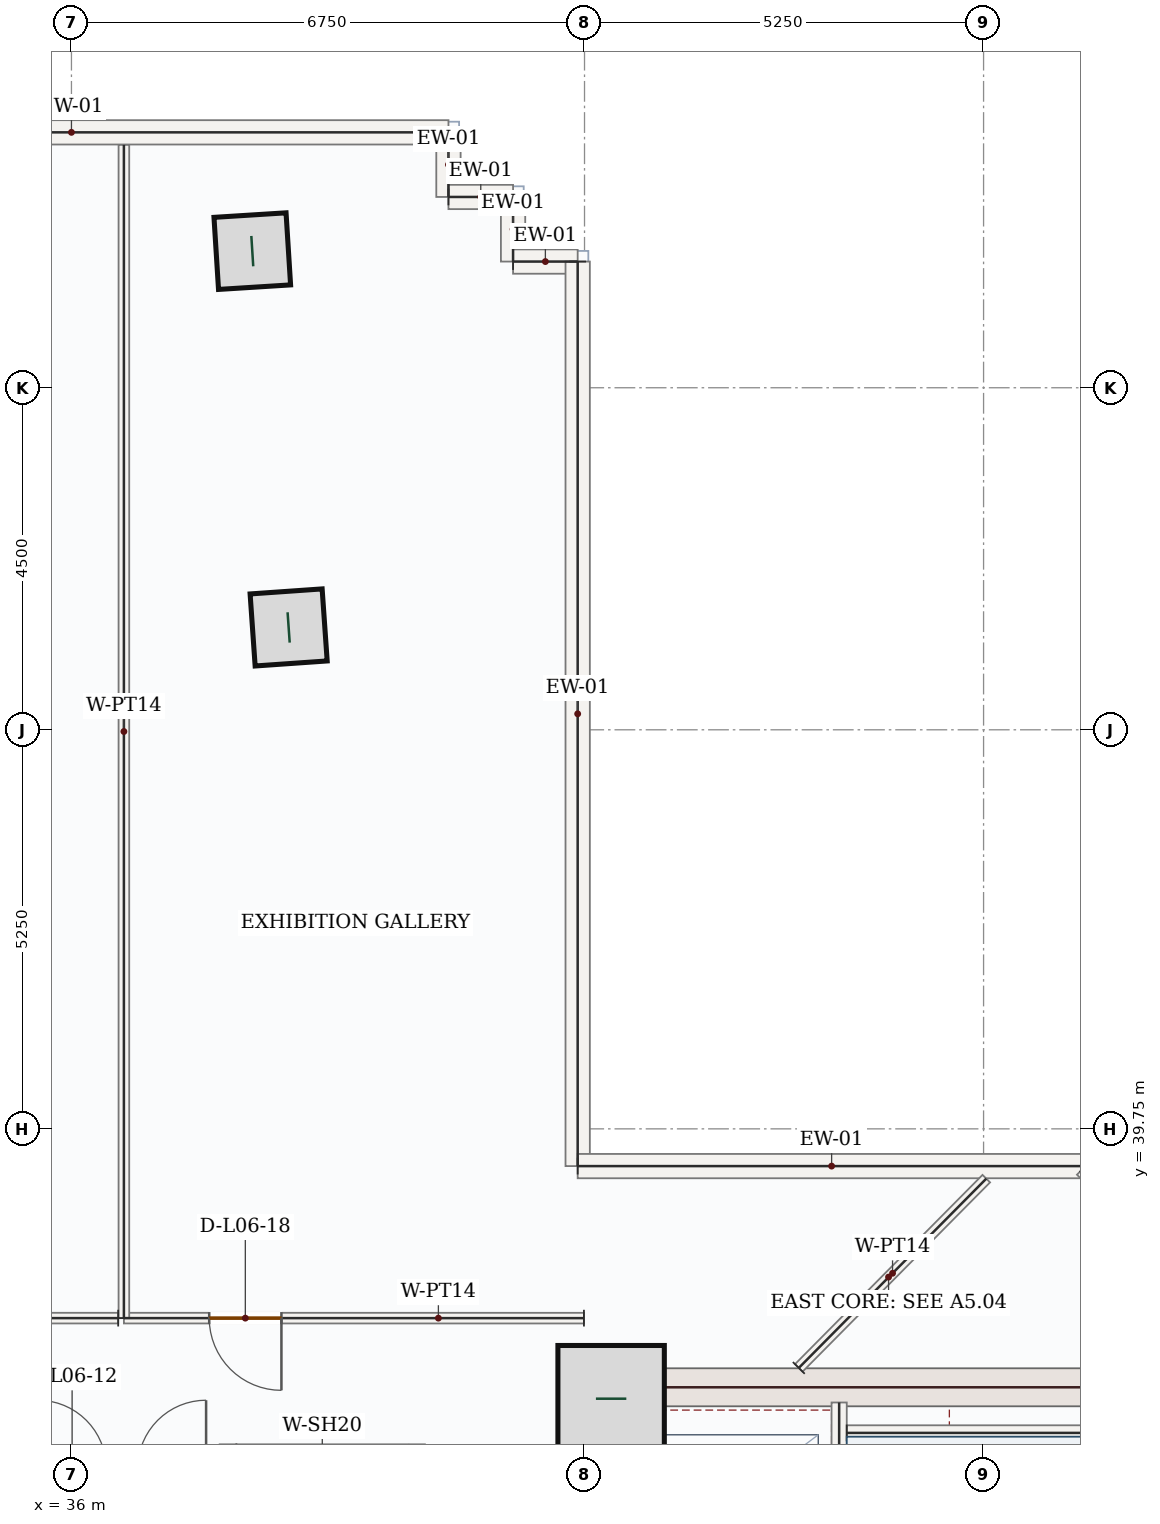
"""IFC4 building model, lengths in metres.
Left out: names, types, materials, properties, quantities, classifications, styles, units other than length and angle.
Written with IfcOpenShell. Run it as: python <this file> out.ifc"""

import sys

from ifc_helpers import new_model, si_unit, direction, frame, frame_2d, origin, origin_2d, place, context, subcontext, project, spatial, rectangle, hollow_rectangle, extrude, source, transform, mapped, element, fill, save


model = new_model("IFC4")
c1 = context("Model", 3, precision=1e-05, world=origin(), true_north=direction((0.0, 1.0)))
c2 = subcontext(c1, "Body", "Model", "MODEL_VIEW")
j1 = project(units=[si_unit("LENGTHUNIT", "METRE"), si_unit("PLANEANGLEUNIT", "RADIAN")], contexts=[c1])
p1 = place(None, origin())
s1 = spatial("IfcSite", under=j1, at=p1, CompositionType="ELEMENT")
p2 = place(p1, origin())
s2 = spatial("IfcBuilding", under=s1, at=p2, CompositionType="ELEMENT")
p3 = place(p2, frame((0.0, 0.0, 33.3)))
s3 = spatial("IfcBuildingStorey", under=s2, at=p3, CompositionType="ELEMENT", Elevation=33.3)
p4 = place(p3, frame((43.0, 28.05, 0.0), z_axis=(0.0, 0.0, 1.0), x_axis=(0.0, 1.0, 0.0)))
e1 = element("IfcWall", 1, at=p4, inside=s3, PredefinedType="SHEAR", context=c2, shape_type="SweptSolid", body=[
    extrude(rectangle(XDim=8.55, YDim=0.5, at=frame_2d((4.275, 0.0))), origin(), (0.0, 0.0, 1.0), 3.95),
])
p5 = place(p4, frame((1.5, 0.0, 0.0)))
e2 = element("IfcOpeningElement", 2, at=p5, cuts=e1, PredefinedType="OPENING", context=c2, shape_type="SweptSolid", body=[
    extrude(rectangle(XDim=1.1, YDim=2.2, at=frame_2d((0.55, 1.1))), frame((0.0, 0.26, 0.0), z_axis=(0.0, -1.0, 0.0), x_axis=(1.0, 0.0, 0.0)), (0.0, 0.0, 1.0), 0.52),
])
m1 = source(origin(), c2, "Body", "SweptSolid", [
    extrude(rectangle(XDim=7.0, YDim=0.5, at=frame_2d((3.5, 0.0))), origin(), (0.0, 0.0, 1.0), 3.95),
])
p6 = place(p3, frame((43.25, 36.35, 0.0), z_axis=(0.0, 0.0, 1.0), x_axis=(1.0, 0.0, 0.0)))
e3 = element("IfcWall", 3, at=p6, inside=s3, PredefinedType="SHEAR", context=c2, shape_type="MappedRepresentation", body=[
    mapped(m1, transform((0.0, 0.0, 0.0), x_axis=(1.0, 0.0, 0.0), y_axis=(0.0, 1.0, 0.0), z_axis=(0.0, 0.0, 1.0), scale=1.0)),
])
m2 = source(origin(), c2, "Body", "SweptSolid", [
    extrude(rectangle(XDim=1.4, YDim=1.4, at=origin_2d()), origin(), (0.0, 0.0, 1.0), 4.2),
])
p7 = place(p3, frame((43.1, 36.2, 0.0), z_axis=(0.0, 0.0, 1.0), x_axis=(1.0, 0.0, 0.0)))
e4 = element("IfcColumn", 4, at=p7, inside=s3, PredefinedType="COLUMN", context=c2, shape_type="MappedRepresentation", body=[
    mapped(m2, transform((0.0, 0.0, 0.0), x_axis=(1.0, 0.0, 0.0), y_axis=(0.0, 1.0, 0.0), z_axis=(0.0, 0.0, 1.0), scale=1.0)),
])
m3 = source(origin(), c2, "Body", "SweptSolid", [
    extrude(hollow_rectangle(XDim=0.95, YDim=0.95, WallThickness=0.05, at=origin_2d()), origin(), (0.0, 0.0, 1.0), 4.2),
])
for number, where, z_axis, x_axis in (
    (5, (38.857, 46.346, 0.0), (0.0, 0.0, 1.0), (-0.07, 0.998, 0.0)),
    (6, (38.379, 51.297, 0.0), (0.0, 0.0, 1.0), (-0.063, 0.998, 0.0)),
):
    element("IfcColumn", number, at=place(p3, frame(where, z_axis=z_axis, x_axis=x_axis)), inside=s3, PredefinedType="COLUMN", context=c2, shape_type="MappedRepresentation", body=[
        mapped(m3, transform((0.0, 0.0, 0.0), x_axis=(1.0, 0.0, 0.0), y_axis=(0.0, 1.0, 0.0), z_axis=(0.0, 0.0, 1.0), scale=1.0)),
    ])
m4 = source(origin(), c2, "Body", "SweptSolid", [
    extrude(rectangle(XDim=9.92, YDim=0.32, at=frame_2d((4.96, 0.0))), origin(), (0.0, 0.0, 1.0), 3.95),
])
p8 = place(p3, frame((31.04, 52.86, 0.0), z_axis=(0.0, 0.0, 1.0), x_axis=(1.0, 0.0, 0.0)))
e7 = element("IfcWall", 7, at=p8, inside=s3, PredefinedType="SOLIDWALL", context=c2, shape_type="MappedRepresentation", body=[
    mapped(m4, transform((0.0, 0.0, 0.0), x_axis=(1.0, 0.0, 0.0), y_axis=(0.0, 1.0, 0.0), z_axis=(0.0, 0.0, 1.0), scale=1.0)),
])
m5 = source(origin(), c2, "Body", "SweptSolid", [
    extrude(rectangle(XDim=0.85, YDim=0.32, at=frame_2d((0.425, 0.0))), origin(), (0.0, 0.0, 1.0), 3.95),
])
for number, where, z_axis, x_axis in (
    (8, (40.96, 52.86, 0.0), (0.0, 0.0, 1.0), (0.0, -1.0, 0.0)),
    (9, (40.96, 52.01, 0.0), (0.0, 0.0, 1.0), (1.0, 0.0, 0.0)),
    (10, (41.81, 52.01, 0.0), (0.0, 0.0, 1.0), (0.0, -1.0, 0.0)),
):
    element("IfcWall", number, at=place(p3, frame(where, z_axis=z_axis, x_axis=x_axis)), inside=s3, PredefinedType="SOLIDWALL", context=c2, shape_type="MappedRepresentation", body=[
        mapped(m5, transform((0.0, 0.0, 0.0), x_axis=(1.0, 0.0, 0.0), y_axis=(0.0, 1.0, 0.0), z_axis=(0.0, 0.0, 1.0), scale=1.0)),
    ])
m6 = source(origin(), c2, "Body", "SweptSolid", [
    extrude(rectangle(XDim=0.85, YDim=0.32, at=frame_2d((0.425, 0.0))), origin(), (0.0, 0.0, 1.0), 3.95),
])
p9 = place(p3, frame((41.81, 51.16, 0.0), z_axis=(0.0, 0.0, 1.0), x_axis=(1.0, 0.0, 0.0)))
e11 = element("IfcWall", 11, at=p9, inside=s3, PredefinedType="SOLIDWALL", context=c2, shape_type="MappedRepresentation", body=[
    mapped(m6, transform((0.0, 0.0, 0.0), x_axis=(1.0, 0.0, 0.0), y_axis=(0.0, 1.0, 0.0), z_axis=(0.0, 0.0, 1.0), scale=1.0)),
])
m7 = source(origin(), c2, "Body", "SweptSolid", [
    extrude(rectangle(XDim=11.9, YDim=0.32, at=frame_2d((5.95, 0.0))), origin(), (0.0, 0.0, 1.0), 3.95),
])
p10 = place(p3, frame((42.66, 51.16, 0.0), z_axis=(0.0, 0.0, 1.0), x_axis=(0.0, -1.0, 0.0)))
e12 = element("IfcWall", 12, at=p10, inside=s3, PredefinedType="SOLIDWALL", context=c2, shape_type="MappedRepresentation", body=[
    mapped(m7, transform((0.0, 0.0, 0.0), x_axis=(1.0, 0.0, 0.0), y_axis=(0.0, 1.0, 0.0), z_axis=(0.0, 0.0, 1.0), scale=1.0)),
])
m8 = source(origin(), c2, "Body", "SweptSolid", [
    extrude(rectangle(XDim=6.682, YDim=0.32, at=frame_2d((3.341, 0.0))), origin(), (0.0, 0.0, 1.0), 3.95),
])
p11 = place(p3, frame((42.66, 39.26, 0.0), z_axis=(0.0, 0.0, 1.0), x_axis=(1.0, 0.0, 0.0)))
e13 = element("IfcWall", 13, at=p11, inside=s3, PredefinedType="SOLIDWALL", context=c2, shape_type="MappedRepresentation", body=[
    mapped(m8, transform((0.0, 0.0, 0.0), x_axis=(1.0, 0.0, 0.0), y_axis=(0.0, 1.0, 0.0), z_axis=(0.0, 0.0, 1.0), scale=1.0)),
])
m9 = source(origin(), c2, "Body", "SweptSolid", [
    extrude(rectangle(XDim=5.258, YDim=0.32, at=frame_2d((2.629, 0.0))), origin(), (0.0, 0.0, 1.0), 3.95),
])
p12 = place(p3, frame((49.342, 39.26, 0.0), z_axis=(0.0, 0.0, 1.0), x_axis=(0.707106781187, -0.707106781187, 0.0)))
e14 = element("IfcWall", 14, at=p12, inside=s3, PredefinedType="SOLIDWALL", context=c2, shape_type="MappedRepresentation", body=[
    mapped(m9, transform((0.0, 0.0, 0.0), x_axis=(1.0, 0.0, 0.0), y_axis=(0.0, 1.0, 0.0), z_axis=(0.0, 0.0, 1.0), scale=1.0)),
])
p13 = place(p3, frame((46.1, 28.15, 0.0), z_axis=(0.0, 0.0, 1.0), x_axis=(0.0, 1.0, 0.0)))
e15 = element("IfcWall", 15, at=p13, inside=s3, PredefinedType="SOLIDWALL", context=c2, shape_type="SweptSolid", body=[
    extrude(rectangle(XDim=8.0, YDim=0.2, at=frame_2d((4.0, 0.0))), origin(), (0.0, 0.0, 1.0), 3.95),
])
p14 = place(p13, frame((0.4, 0.0, 0.0)))
e16 = element("IfcOpeningElement", 16, at=p14, cuts=e15, PredefinedType="OPENING", context=c2, shape_type="SweptSolid", body=[
    extrude(rectangle(XDim=1.05, YDim=2.15, at=frame_2d((0.525, 1.075))), frame((0.0, 0.11, 0.0), z_axis=(0.0, -1.0, 0.0), x_axis=(1.0, 0.0, 0.0)), (0.0, 0.0, 1.0), 0.22),
])
m10 = source(origin(), c2, "Body", "SweptSolid", [
    extrude(rectangle(XDim=3.25, YDim=0.2, at=frame_2d((1.625, 0.0))), origin(), (0.0, 0.0, 1.0), 3.95),
])
p15 = place(p3, frame((46.2, 35.75, 0.0), z_axis=(0.0, 0.0, 1.0), x_axis=(1.0, 0.0, 0.0)))
e17 = element("IfcWall", 17, at=p15, inside=s3, PredefinedType="SOLIDWALL", context=c2, shape_type="MappedRepresentation", body=[
    mapped(m10, transform((0.0, 0.0, 0.0), x_axis=(1.0, 0.0, 0.0), y_axis=(0.0, 1.0, 0.0), z_axis=(0.0, 0.0, 1.0), scale=1.0)),
])
m11 = source(origin(), c2, "Body", "SweptSolid", [
    extrude(rectangle(XDim=2.4, YDim=0.2, at=frame_2d((1.2, 0.0))), origin(), (0.0, 0.0, 1.0), 3.95),
])
for number, where, z_axis, x_axis in (
    (18, (38.05, 33.2, 0.0), (0.0, 0.0, 1.0), (0.0, 1.0, 0.0)),
    (19, (40.55, 33.2, 0.0), (0.0, 0.0, 1.0), (0.0, 1.0, 0.0)),
):
    element("IfcWall", number, at=place(p3, frame(where, z_axis=z_axis, x_axis=x_axis)), inside=s3, PredefinedType="SOLIDWALL", context=c2, shape_type="MappedRepresentation", body=[
        mapped(m11, transform((0.0, 0.0, 0.0), x_axis=(1.0, 0.0, 0.0), y_axis=(0.0, 1.0, 0.0), z_axis=(0.0, 0.0, 1.0), scale=1.0)),
    ])
m12 = source(origin(), c2, "Body", "SweptSolid", [
    extrude(rectangle(XDim=3.505, YDim=0.14, at=frame_2d((1.752, 0.0))), origin(), (0.0, 0.0, 1.0), 3.95),
])
p16 = place(p3, frame((45.569, 36.605, 0.0), z_axis=(0.0, 0.0, 1.0), x_axis=(0.703790445361, 0.710407635811, 0.0)))
e20 = element("IfcWall", 20, at=p16, inside=s3, PredefinedType="PARTITIONING", context=c2, shape_type="MappedRepresentation", body=[
    mapped(m12, transform((0.0, 0.0, 0.0), x_axis=(1.0, 0.0, 0.0), y_axis=(0.0, 1.0, 0.0), z_axis=(0.0, 0.0, 1.0), scale=1.0)),
])
p17 = place(p3, frame((42.742, 37.26, 0.0), z_axis=(0.0, 0.0, 1.0), x_axis=(-0.999999999186, 4.0337219e-05, 0.0)))
e21 = element("IfcWall", 21, at=p17, inside=s3, PredefinedType="PARTITIONING", context=c2, shape_type="SweptSolid", body=[
    extrude(rectangle(XDim=6.052, YDim=0.14, at=frame_2d((3.026, 0.0))), origin(), (0.0, 0.0, 1.0), 3.95),
])
p18 = place(p17, frame((3.98, 0.0, 0.0)))
e22 = element("IfcOpeningElement", 22, at=p18, cuts=e21, PredefinedType="OPENING", context=c2, shape_type="SweptSolid", body=[
    extrude(rectangle(XDim=0.95, YDim=2.15, at=frame_2d((0.475, 1.075))), frame((0.0, 0.08, 0.0), z_axis=(0.0, -1.0, 0.0), x_axis=(1.0, 0.0, 0.0)), (0.0, 0.0, 1.0), 0.16),
])
m13 = source(origin(), c2, "Body", "SweptSolid", [
    extrude(rectangle(XDim=15.435, YDim=0.14, at=frame_2d((7.718, 0.0))), origin(), (0.0, 0.0, 1.0), 3.95),
])
p19 = place(p3, frame((36.69, 37.26, 0.0), z_axis=(0.0, 0.0, 1.0), x_axis=(0.0, 1.0, 0.0)))
e23 = element("IfcWall", 23, at=p19, inside=s3, PredefinedType="PARTITIONING", context=c2, shape_type="MappedRepresentation", body=[
    mapped(m13, transform((0.0, 0.0, 0.0), x_axis=(1.0, 0.0, 0.0), y_axis=(0.0, 1.0, 0.0), z_axis=(0.0, 0.0, 1.0), scale=1.0)),
])
p20 = place(p3, frame((36.615, 37.26, 0.0), z_axis=(0.0, 0.0, 1.0), x_axis=(-0.999999999449, -3.3182904e-05, 0.0)))
e24 = element("IfcWall", 24, at=p20, inside=s3, PredefinedType="PARTITIONING", context=c2, shape_type="SweptSolid", body=[
    extrude(rectangle(XDim=7.357, YDim=0.14, at=frame_2d((3.679, 0.0))), origin(), (0.0, 0.0, 1.0), 3.95),
])
p21 = place(p20, frame((1.41, 0.0, 0.0)))
e25 = element("IfcOpeningElement", 25, at=p21, cuts=e24, PredefinedType="OPENING", context=c2, shape_type="SweptSolid", body=[
    extrude(rectangle(XDim=0.95, YDim=2.15, at=frame_2d((0.475, 1.075))), frame((0.0, 0.08, 0.0), z_axis=(0.0, -1.0, 0.0), x_axis=(1.0, 0.0, 0.0)), (0.0, 0.0, 1.0), 0.16),
])
m14 = source(origin(), c2, "Body", "SweptSolid", [
    extrude(rectangle(XDim=0.95, YDim=2.15, at=frame_2d((0.475, 1.075))), frame((0.0, 0.025, 0.0), z_axis=(0.0, -1.0, 0.0), x_axis=(1.0, 0.0, 0.0)), (0.0, 0.0, 1.0), 0.05),
])
p22 = place(p18, origin())
e26 = element("IfcDoor", 26, at=p22, inside=s3, OperationType="SINGLE_SWING_LEFT", PredefinedType="DOOR", context=c2, shape_type="MappedRepresentation", body=[
    mapped(m14, transform((0.0, 0.0, 0.0), x_axis=(1.0, 0.0, 0.0), y_axis=(0.0, 1.0, 0.0), z_axis=(0.0, 0.0, 1.0), scale=1.0)),
])
fill(e22, e26)
save(model, sys.argv[1])
